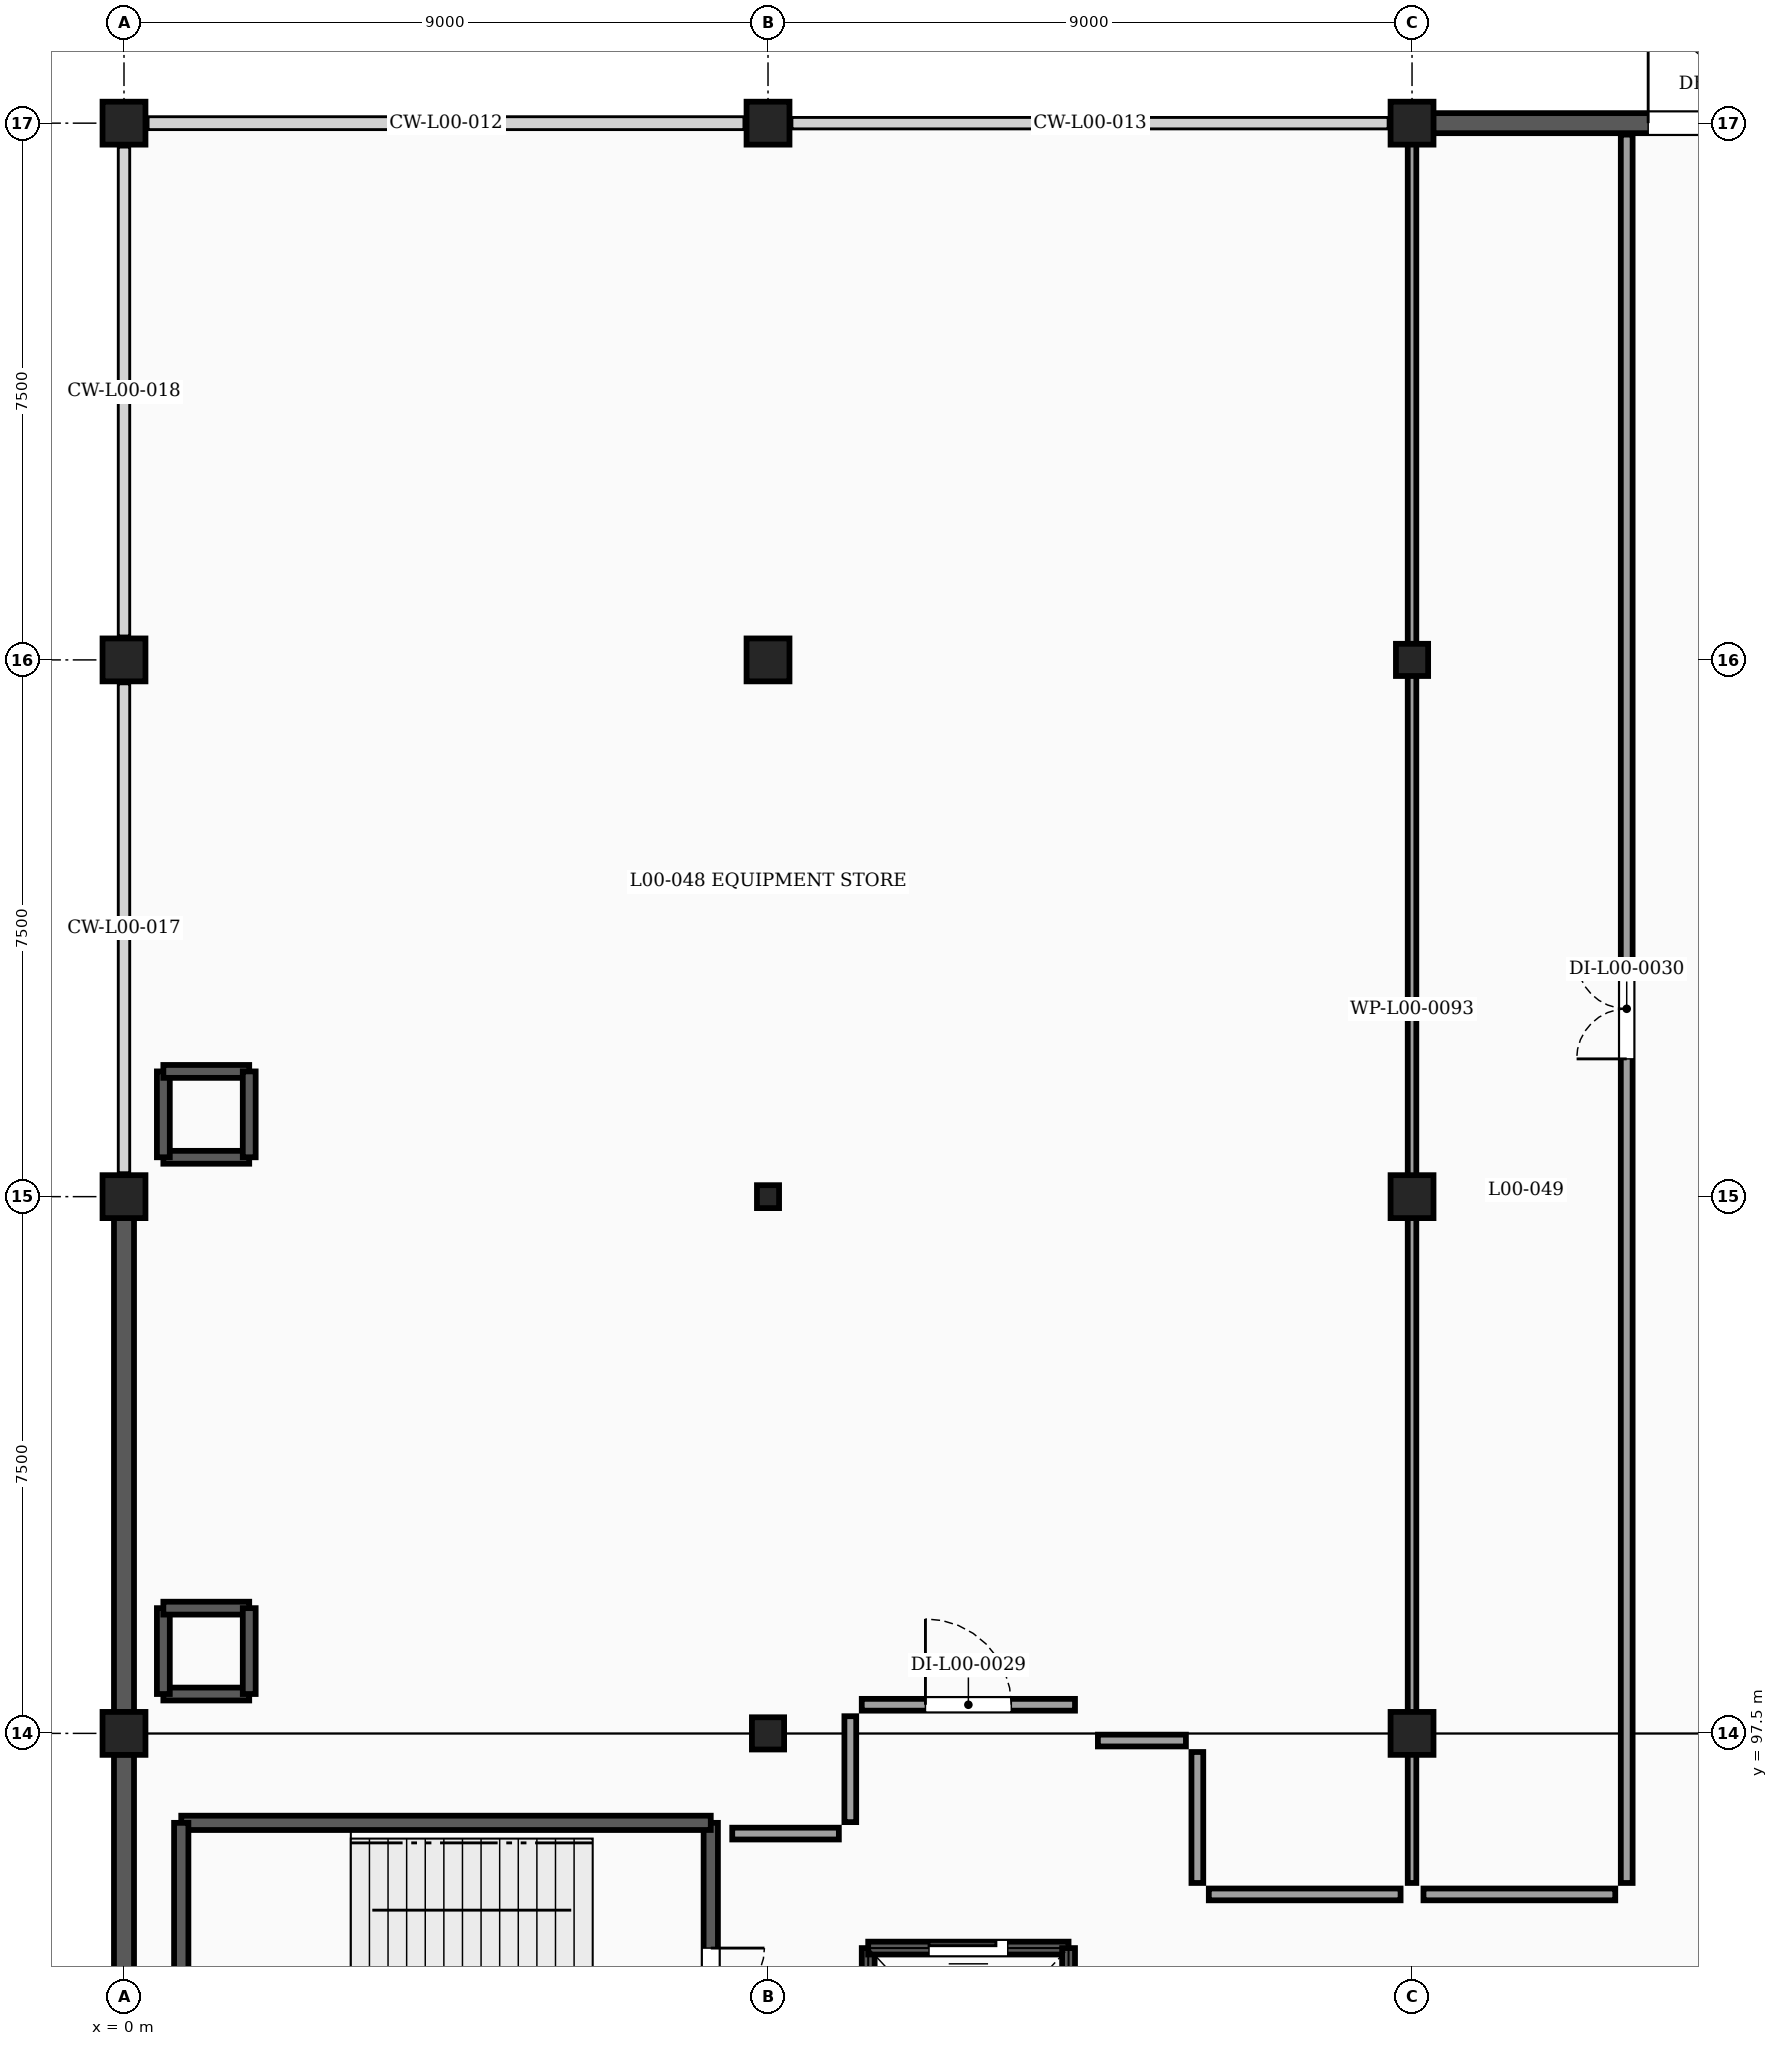
"""IFC4 building model, lengths in metres.
Left out: names, types, materials, properties, quantities, classifications, styles, units other than length and angle.
Written with IfcOpenShell. Run it as: python <this file> out.ifc"""

import sys

from ifc_helpers import new_model, si_unit, direction, frame, frame_2d, origin, origin_2d, place, context, subcontext, project, spatial, rectangle, i_section, extrude, element, fill, save


model = new_model("IFC4")
c1 = context("Model", 3, precision=1e-05, world=origin(), true_north=direction((0.0, 1.0)))
c2 = subcontext(c1, "Body", "Model", "MODEL_VIEW")
j1 = project(units=[si_unit("LENGTHUNIT", "METRE"), si_unit("PLANEANGLEUNIT", "RADIAN")], contexts=[c1])
p1 = place(None, origin())
s1 = spatial("IfcSite", under=j1, at=p1, CompositionType="ELEMENT")
p2 = place(p1, origin())
s2 = spatial("IfcBuilding", under=s1, at=p2, CompositionType="ELEMENT")
p3 = place(p2, origin())
s3 = spatial("IfcBuildingStorey", under=s2, at=p3, CompositionType="ELEMENT", Elevation=0.0)
p4 = place(p3, frame((0.0, 97.5, -0.25), z_axis=(0.0, 0.0, 1.0), x_axis=(1.0, 0.0, 0.0)))
e1 = element("IfcColumn", 1, at=p4, inside=s3, PredefinedType="COLUMN", context=c2, shape_type="SweptSolid", body=[
    extrude(rectangle(XDim=0.6, YDim=0.6, at=origin_2d()), origin(), (0.0, 0.0, 1.0), 4.75),
])
p5 = place(p3, frame((9.0, 97.5, -0.25), z_axis=(0.0, 0.0, 1.0), x_axis=(1.0, 0.0, 0.0)))
e2 = element("IfcColumn", 2, at=p5, inside=s3, PredefinedType="COLUMN", context=c2, shape_type="SweptSolid", body=[
    extrude(rectangle(XDim=0.45, YDim=0.45, at=origin_2d()), origin(), (0.0, 0.0, 1.0), 4.75),
])
for number, where, z_axis, x_axis in (
    (3, (18.0, 97.5, -0.25), (0.0, 0.0, 1.0), (1.0, 0.0, 0.0)),
    (4, (0.0, 105.0, -0.25), (0.0, 0.0, 1.0), (1.0, 0.0, 0.0)),
):
    element("IfcColumn", number, at=place(p3, frame(where, z_axis=z_axis, x_axis=x_axis)), inside=s3, PredefinedType="COLUMN", context=c2, shape_type="SweptSolid", body=[
        extrude(rectangle(XDim=0.6, YDim=0.6, at=origin_2d()), origin(), (0.0, 0.0, 1.0), 4.75),
    ])
p6 = place(p3, frame((9.0, 105.0, -0.25), z_axis=(0.0, 0.0, 1.0), x_axis=(1.0, 0.0, 0.0)))
e5 = element("IfcColumn", 5, at=p6, inside=s3, PredefinedType="COLUMN", context=c2, shape_type="SweptSolid", body=[
    extrude(i_section(OverallWidth=0.309, OverallDepth=0.321, WebThickness=0.014, FlangeThickness=0.022, FilletRadius=0.017, at=origin_2d()), origin(), (0.0, 0.0, 1.0), 4.75),
])
for number, where, z_axis, x_axis in (
    (6, (18.0, 105.0, -0.25), (0.0, 0.0, 1.0), (1.0, 0.0, 0.0)),
    (7, (0.0, 112.5, -0.25), (0.0, 0.0, 1.0), (1.0, 0.0, 0.0)),
    (8, (9.0, 112.5, -0.25), (0.0, 0.0, 1.0), (1.0, 0.0, 0.0)),
):
    element("IfcColumn", number, at=place(p3, frame(where, z_axis=z_axis, x_axis=x_axis)), inside=s3, PredefinedType="COLUMN", context=c2, shape_type="SweptSolid", body=[
        extrude(rectangle(XDim=0.6, YDim=0.6, at=origin_2d()), origin(), (0.0, 0.0, 1.0), 4.75),
    ])
p7 = place(p3, frame((18.0, 112.5, -0.25), z_axis=(0.0, 0.0, 1.0), x_axis=(1.0, 0.0, 0.0)))
e9 = element("IfcColumn", 9, at=p7, inside=s3, PredefinedType="COLUMN", context=c2, shape_type="SweptSolid", body=[
    extrude(rectangle(XDim=0.45, YDim=0.45, at=origin_2d()), origin(), (0.0, 0.0, 1.0), 4.75),
])
for number, where, z_axis, x_axis in (
    (10, (0.0, 120.0, -0.25), (0.0, 0.0, 1.0), (1.0, 0.0, 0.0)),
    (11, (9.0, 120.0, -0.25), (0.0, 0.0, 1.0), (1.0, 0.0, 0.0)),
    (12, (18.0, 120.0, -0.25), (0.0, 0.0, 1.0), (1.0, 0.0, 0.0)),
):
    element("IfcColumn", number, at=place(p3, frame(where, z_axis=z_axis, x_axis=x_axis)), inside=s3, PredefinedType="COLUMN", context=c2, shape_type="SweptSolid", body=[
        extrude(rectangle(XDim=0.6, YDim=0.6, at=origin_2d()), origin(), (0.0, 0.0, 1.0), 4.75),
    ])
p8 = place(p3, frame((18.296, 120.0, 0.0), z_axis=(0.0, 0.0, 1.0), x_axis=(1.0, 0.0, 0.0)))
e13 = element("IfcWall", 13, at=p8, inside=s3, PredefinedType="SOLIDWALL", context=c2, shape_type="SweptSolid", body=[
    extrude(rectangle(XDim=8.408, YDim=0.28, at=frame_2d((4.204, 0.0))), origin(), (0.0, 0.0, 1.0), 3.442),
])
p9 = place(p8, frame((3.004, 0.0, 0.0)))
e14 = element("IfcOpeningElement", 14, at=p9, cuts=e13, PredefinedType="OPENING", context=c2, shape_type="SweptSolid", body=[
    extrude(rectangle(XDim=2.4, YDim=2.2, at=frame_2d((1.2, 1.1))), frame((0.0, 0.15, 0.0), z_axis=(0.0, -1.0, 0.0), x_axis=(1.0, 0.0, 0.0)), (0.0, 0.0, 1.0), 0.3),
])
for number, where, z_axis, x_axis in (
    (15, (0.0, 90.296, 0.0), (0.0, 0.0, 1.0), (0.0, 1.0, 0.0)),
    (16, (0.0, 97.796, 0.0), (0.0, 0.0, 1.0), (0.0, 1.0, 0.0)),
):
    element("IfcWall", number, at=place(p3, frame(where, z_axis=z_axis, x_axis=x_axis)), inside=s3, PredefinedType="SOLIDWALL", context=c2, shape_type="SweptSolid", body=[
        extrude(rectangle(XDim=6.908, YDim=0.28, at=frame_2d((3.454, 0.0))), origin(), (0.0, 0.0, 1.0), 3.442),
    ])
for number, where, z_axis, x_axis in (
    (17, (1.75, 98.05, 0.0), (0.0, 0.0, 1.0), (-1.0, 0.0, 0.0)),
    (18, (0.55, 98.05, 0.0), (0.0, 0.0, 1.0), (0.0, 1.0, 0.0)),
    (19, (0.55, 99.25, 0.0), (0.0, 0.0, 1.0), (1.0, 0.0, 0.0)),
    (20, (1.75, 99.25, 0.0), (0.0, 0.0, 1.0), (0.0, -1.0, 0.0)),
    (21, (1.75, 105.55, 0.0), (0.0, 0.0, 1.0), (-1.0, 0.0, 0.0)),
    (22, (0.55, 105.55, 0.0), (0.0, 0.0, 1.0), (0.0, 1.0, 0.0)),
    (23, (0.55, 106.75, 0.0), (0.0, 0.0, 1.0), (1.0, 0.0, 0.0)),
    (24, (1.75, 106.75, 0.0), (0.0, 0.0, 1.0), (0.0, -1.0, 0.0)),
):
    element("IfcWall", number, at=place(p3, frame(where, z_axis=z_axis, x_axis=x_axis)), inside=s3, PredefinedType="SHEAR", context=c2, shape_type="SweptSolid", body=[
        extrude(rectangle(XDim=1.2, YDim=0.18, at=frame_2d((0.6, 0.0))), origin(), (0.0, 0.0, 1.0), 4.1),
    ])
p10 = place(p3, frame((8.2, 96.25, 0.0), z_axis=(0.0, 0.0, 1.0), x_axis=(0.0, -1.0, 0.0)))
e25 = element("IfcWall", 25, at=p10, inside=s3, PredefinedType="SHEAR", context=c2, shape_type="SweptSolid", body=[
    extrude(rectangle(XDim=5.0, YDim=0.2, at=frame_2d((2.5, 0.0))), origin(), (0.0, 0.0, 1.0), 4.1),
])
p11 = place(p10, frame((1.75, 0.0, 0.0)))
e26 = element("IfcOpeningElement", 26, at=p11, cuts=e25, PredefinedType="OPENING", context=c2, shape_type="SweptSolid", body=[
    extrude(rectangle(XDim=1.5, YDim=2.15, at=frame_2d((0.75, 1.075))), frame((0.0, 0.11, 0.0), z_axis=(0.0, -1.0, 0.0), x_axis=(1.0, 0.0, 0.0)), (0.0, 0.0, 1.0), 0.22),
])
p12 = place(p3, frame((8.2, 96.25, 0.0), z_axis=(0.0, 0.0, 1.0), x_axis=(-1.0, 0.0, 0.0)))
e27 = element("IfcWall", 27, at=p12, inside=s3, PredefinedType="SHEAR", context=c2, shape_type="SweptSolid", body=[
    extrude(rectangle(XDim=7.4, YDim=0.2, at=frame_2d((3.7, 0.0))), origin(), (0.0, 0.0, 1.0), 4.1),
])
p13 = place(p3, frame((0.8, 96.25, 0.0), z_axis=(0.0, 0.0, 1.0), x_axis=(0.0, -1.0, 0.0)))
e28 = element("IfcWall", 28, at=p13, inside=s3, PredefinedType="SHEAR", context=c2, shape_type="SweptSolid", body=[
    extrude(rectangle(XDim=5.0, YDim=0.2, at=frame_2d((2.5, 0.0))), origin(), (0.0, 0.0, 1.0), 4.1),
])
p14 = place(p3, frame((10.4, 91.5, -0.2), z_axis=(0.0, 0.0, 1.0), x_axis=(0.0, 1.0, 0.0)))
e29 = element("IfcWall", 29, at=p14, inside=s3, PredefinedType="SHEAR", context=c2, shape_type="SweptSolid", body=[
    extrude(rectangle(XDim=3.0, YDim=0.18, at=frame_2d((1.5, 0.0))), origin(), (0.0, 0.0, 1.0), 4.3),
])
p15 = place(p3, frame((10.4, 94.5, -0.2), z_axis=(0.0, 0.0, 1.0), x_axis=(1.0, 0.0, 0.0)))
e30 = element("IfcWall", 30, at=p15, inside=s3, PredefinedType="SHEAR", context=c2, shape_type="SweptSolid", body=[
    extrude(rectangle(XDim=2.8, YDim=0.18, at=frame_2d((1.4, 0.0))), origin(), (0.0, 0.0, 1.0), 4.3),
])
p16 = place(p15, frame((0.85, 0.0, 0.2)))
e31 = element("IfcOpeningElement", 31, at=p16, cuts=e30, PredefinedType="OPENING", context=c2, shape_type="SweptSolid", body=[
    extrude(rectangle(XDim=1.1, YDim=2.15, at=frame_2d((0.55, 1.075))), frame((0.0, 0.1, 0.0), z_axis=(0.0, -1.0, 0.0), x_axis=(1.0, 0.0, 0.0)), (0.0, 0.0, 1.0), 0.2),
])
p17 = place(p3, frame((13.2, 94.5, -0.2), z_axis=(0.0, 0.0, 1.0), x_axis=(0.0, -1.0, 0.0)))
e32 = element("IfcWall", 32, at=p17, inside=s3, PredefinedType="SHEAR", context=c2, shape_type="SweptSolid", body=[
    extrude(rectangle(XDim=3.0, YDim=0.18, at=frame_2d((1.5, 0.0))), origin(), (0.0, 0.0, 1.0), 4.3),
])
p18 = place(p3, frame((15.0, 97.24, 0.0), z_axis=(0.0, 0.0, 1.0), x_axis=(0.0, -1.0, 0.0)))
e33 = element("IfcWall", 33, at=p18, inside=s3, PredefinedType="PARTITIONING", context=c2, shape_type="SweptSolid", body=[
    extrude(rectangle(XDim=1.83, YDim=0.165, at=frame_2d((0.915, 0.0))), origin(), (0.0, 0.0, 1.0), 3.642),
])
p19 = place(p3, frame((15.16, 95.25, 0.0), z_axis=(0.0, 0.0, 1.0), x_axis=(1.0, 0.0, 0.0)))
e34 = element("IfcWall", 34, at=p19, inside=s3, PredefinedType="PARTITIONING", context=c2, shape_type="SweptSolid", body=[
    extrude(rectangle(XDim=2.68, YDim=0.165, at=frame_2d((1.34, 0.0))), origin(), (0.0, 0.0, 1.0), 4.1),
])
p20 = place(p3, frame((8.5, 96.1, 0.0), z_axis=(0.0, 0.0, 1.0), x_axis=(1.0, 0.0, 0.0)))
e35 = element("IfcWall", 35, at=p20, inside=s3, PredefinedType="PARTITIONING", context=c2, shape_type="SweptSolid", body=[
    extrude(rectangle(XDim=1.49, YDim=0.165, at=frame_2d((0.745, 0.0))), origin(), (0.0, 0.0, 1.0), 4.1),
])
p21 = place(p3, frame((10.15, 96.26, 0.0), z_axis=(0.0, 0.0, 1.0), x_axis=(0.0, 1.0, 0.0)))
e36 = element("IfcWall", 36, at=p21, inside=s3, PredefinedType="PARTITIONING", context=c2, shape_type="SweptSolid", body=[
    extrude(rectangle(XDim=1.48, YDim=0.165, at=frame_2d((0.74, 0.0))), origin(), (0.0, 0.0, 1.0), 4.1),
])
p22 = place(p3, frame((10.31, 97.9, 0.0), z_axis=(0.0, 0.0, 1.0), x_axis=(1.0, 0.0, 0.0)))
e37 = element("IfcWall", 37, at=p22, inside=s3, PredefinedType="PARTITIONING", context=c2, shape_type="SweptSolid", body=[
    extrude(rectangle(XDim=2.98, YDim=0.165, at=frame_2d((1.49, 0.0))), origin(), (0.0, 0.0, 1.0), 4.1),
])
p23 = place(p22, frame((0.89, 0.0, 0.0)))
e38 = element("IfcOpeningElement", 38, at=p23, cuts=e37, PredefinedType="OPENING", context=c2, shape_type="SweptSolid", body=[
    extrude(rectangle(XDim=1.2, YDim=2.15, at=frame_2d((0.6, 1.075))), frame((0.0, 0.093, 0.0), z_axis=(0.0, -1.0, 0.0), x_axis=(1.0, 0.0, 0.0)), (0.0, 0.0, 1.0), 0.185),
])
p24 = place(p3, frame((13.61, 97.4, 0.0), z_axis=(0.0, 0.0, 1.0), x_axis=(1.0, 0.0, 0.0)))
e39 = element("IfcWall", 39, at=p24, inside=s3, PredefinedType="PARTITIONING", context=c2, shape_type="SweptSolid", body=[
    extrude(rectangle(XDim=1.23, YDim=0.165, at=frame_2d((0.615, 0.0))), origin(), (0.0, 0.0, 1.0), 3.192),
])
p25 = place(p3, frame((18.16, 95.25, 0.0), z_axis=(0.0, 0.0, 1.0), x_axis=(1.0, 0.0, 0.0)))
e40 = element("IfcWall", 40, at=p25, inside=s3, PredefinedType="PARTITIONING", context=c2, shape_type="SweptSolid", body=[
    extrude(rectangle(XDim=2.68, YDim=0.165, at=frame_2d((1.34, 0.0))), origin(), (0.0, 0.0, 1.0), 4.1),
])
p26 = place(p3, frame((21.0, 95.41, 0.0), z_axis=(0.0, 0.0, 1.0), x_axis=(0.0, 1.0, 0.0)))
e41 = element("IfcWall", 41, at=p26, inside=s3, PredefinedType="PARTITIONING", context=c2, shape_type="SweptSolid", body=[
    extrude(rectangle(XDim=24.43, YDim=0.165, at=frame_2d((12.215, 0.0))), origin(), (0.0, 0.0, 1.0), 3.642),
])
p27 = place(p26, frame((11.515, 0.0, 0.0)))
e42 = element("IfcOpeningElement", 42, at=p27, cuts=e41, PredefinedType="OPENING", context=c2, shape_type="SweptSolid", body=[
    extrude(rectangle(XDim=1.4, YDim=2.15, at=frame_2d((0.7, 1.075))), frame((0.0, 0.093, 0.0), z_axis=(0.0, -1.0, 0.0), x_axis=(1.0, 0.0, 0.0)), (0.0, 0.0, 1.0), 0.185),
])
p28 = place(p3, frame((18.0, 95.41, 0.0), z_axis=(0.0, 0.0, 1.0), x_axis=(0.0, 1.0, 0.0)))
e43 = element("IfcWall", 43, at=p28, inside=s3, PredefinedType="PARTITIONING", context=c2, shape_type="SweptSolid", body=[
    extrude(rectangle(XDim=24.43, YDim=0.12, at=frame_2d((12.215, 0.0))), origin(), (0.0, 0.0, 1.0), 3.192),
])
p29 = place(p9, origin())
e44 = element("IfcDoor", 44, at=p29, inside=s3, OperationType="DOUBLE_DOOR_SINGLE_SWING", PredefinedType="DOOR", context=c2, shape_type="SweptSolid", body=[
    extrude(rectangle(XDim=2.4, YDim=2.2, at=frame_2d((1.2, 1.1))), frame((0.0, 0.025, 0.0), z_axis=(0.0, -1.0, 0.0), x_axis=(1.0, 0.0, 0.0)), (0.0, 0.0, 1.0), 0.05),
])
fill(e14, e44)
p30 = place(p11, origin())
e45 = element("IfcDoor", 45, at=p30, inside=s3, OperationType="DOUBLE_DOOR_SINGLE_SWING", PredefinedType="DOOR", context=c2, shape_type="SweptSolid", body=[
    extrude(rectangle(XDim=1.5, YDim=2.15, at=frame_2d((0.75, 1.075))), frame((0.0, 0.025, 0.0), z_axis=(0.0, -1.0, 0.0), x_axis=(1.0, 0.0, 0.0)), (0.0, 0.0, 1.0), 0.05),
])
fill(e26, e45)
p31 = place(p16, origin())
e46 = element("IfcDoor", 46, at=p31, inside=s3, OperationType="SLIDING_TO_LEFT", PredefinedType="DOOR", context=c2, shape_type="SweptSolid", body=[
    extrude(rectangle(XDim=1.1, YDim=2.15, at=frame_2d((0.55, 1.075))), frame((0.0, 0.025, 0.0), z_axis=(0.0, -1.0, 0.0), x_axis=(1.0, 0.0, 0.0)), (0.0, 0.0, 1.0), 0.05),
])
fill(e31, e46)
p32 = place(p23, origin())
e47 = element("IfcDoor", 47, at=p32, inside=s3, OperationType="SINGLE_SWING_LEFT", PredefinedType="DOOR", context=c2, shape_type="SweptSolid", body=[
    extrude(rectangle(XDim=1.2, YDim=2.15, at=frame_2d((0.6, 1.075))), frame((0.0, 0.025, 0.0), z_axis=(0.0, -1.0, 0.0), x_axis=(1.0, 0.0, 0.0)), (0.0, 0.0, 1.0), 0.05),
])
fill(e38, e47)
p33 = place(p27, origin())
e48 = element("IfcDoor", 48, at=p33, inside=s3, OperationType="DOUBLE_DOOR_SINGLE_SWING", PredefinedType="DOOR", context=c2, shape_type="SweptSolid", body=[
    extrude(rectangle(XDim=1.4, YDim=2.15, at=frame_2d((0.7, 1.075))), frame((0.0, 0.025, 0.0), z_axis=(0.0, -1.0, 0.0), x_axis=(1.0, 0.0, 0.0)), (0.0, 0.0, 1.0), 0.05),
])
fill(e42, e48)
save(model, sys.argv[1])
